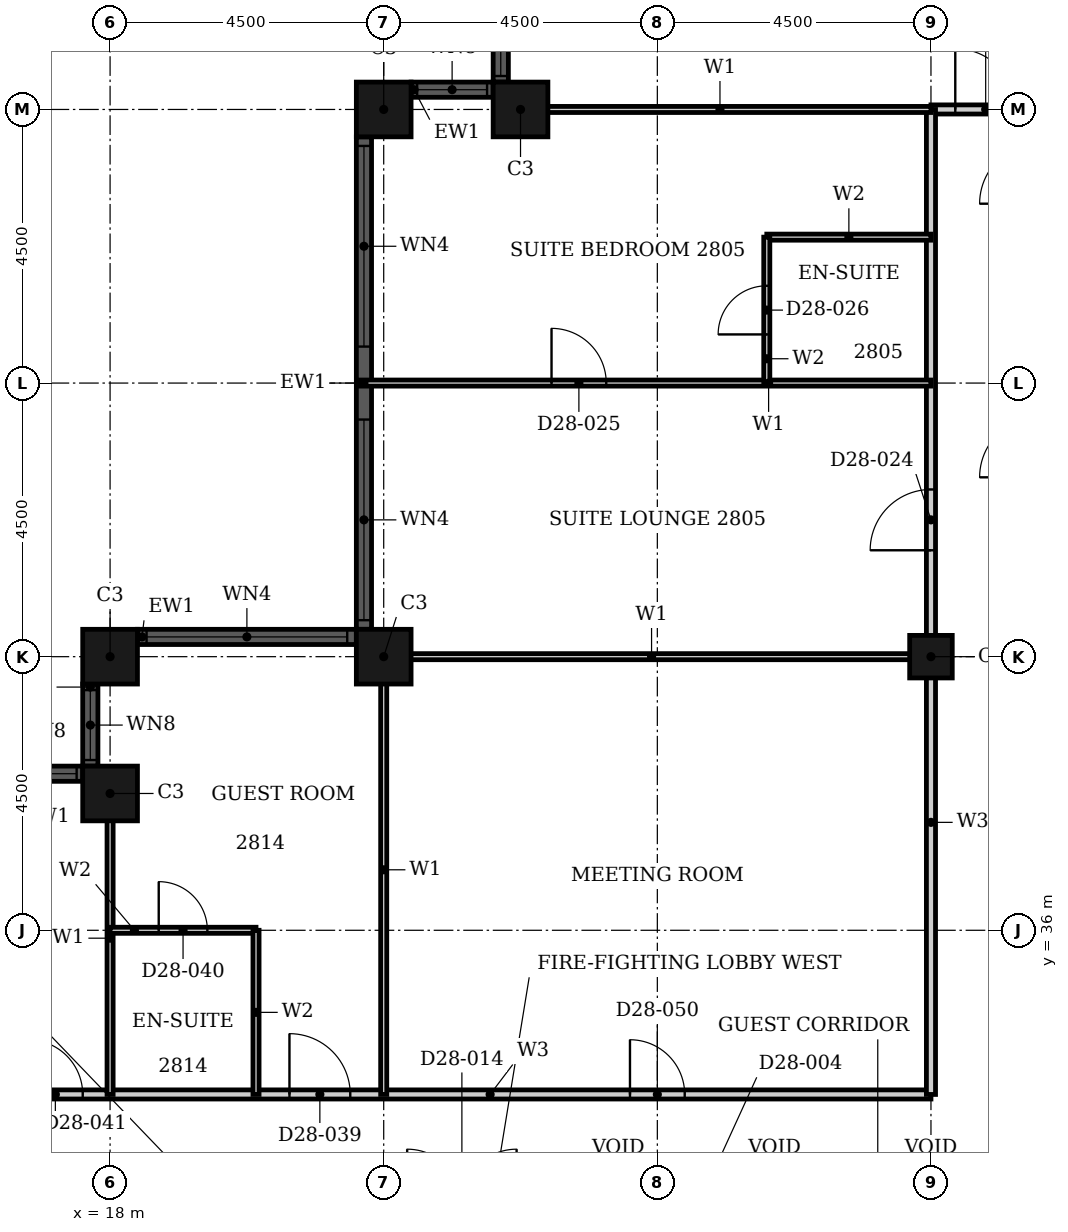
"""IFC4 building model, lengths in metres.
Left out: names, types, materials, properties, quantities, classifications, styles, units other than length and angle.
Written with IfcOpenShell. Run it as: python <this file> out.ifc"""

import sys

from ifc_helpers import new_model, si_unit, direction, frame, frame_2d, origin, origin_2d, place, context, subcontext, project, spatial, rectangle, hollow_rectangle, extrude, element, fill, save


model = new_model("IFC4")
c1 = context("Model", 3, precision=1e-05, world=origin(), true_north=direction((0.0, 1.0)))
c2 = subcontext(c1, "Body", "Model", "MODEL_VIEW")
j1 = project(units=[si_unit("LENGTHUNIT", "METRE"), si_unit("PLANEANGLEUNIT", "RADIAN")], contexts=[c1])
p1 = place(None, origin())
s1 = spatial("IfcSite", under=j1, at=p1, CompositionType="ELEMENT")
p2 = place(p1, origin())
s2 = spatial("IfcBuilding", under=s1, at=p2, CompositionType="ELEMENT")
p3 = place(p2, frame((0.0, 0.0, 115.2)))
s3 = spatial("IfcBuildingStorey", under=s2, at=p3, CompositionType="ELEMENT", Elevation=115.2)
for number, where, z_axis, x_axis in (
    (1, (24.75, 49.5, 0.0), (0.0, 0.0, 1.0), (1.0, 0.0, 0.0)),
    (2, (22.5, 49.5, 0.0), (0.0, 0.0, 1.0), (1.0, 0.0, 0.0)),
    (3, (22.5, 40.5, 0.0), (0.0, 0.0, 1.0), (1.0, 0.0, 0.0)),
    (4, (18.0, 40.5, 0.0), (0.0, 0.0, 1.0), (1.0, 0.0, 0.0)),
    (5, (18.0, 38.25, 0.0), (0.0, 0.0, 1.0), (1.0, 0.0, 0.0)),
):
    element("IfcColumn", number, at=place(p3, frame(where, z_axis=z_axis, x_axis=x_axis)), inside=s3, PredefinedType="COLUMN", context=c2, shape_type="SweptSolid", body=[
        extrude(hollow_rectangle(XDim=0.9, YDim=0.9, WallThickness=0.028, at=origin_2d()), origin(), (0.0, 0.0, 1.0), 3.6),
    ])
p4 = place(p3, frame((31.5, 40.5, 0.0), z_axis=(0.0, 0.0, 1.0), x_axis=(1.0, 0.0, 0.0)))
e6 = element("IfcColumn", 6, at=p4, inside=s3, PredefinedType="COLUMN", context=c2, shape_type="SweptSolid", body=[
    extrude(hollow_rectangle(XDim=0.7, YDim=0.7, WallThickness=0.022, at=origin_2d()), origin(), (0.0, 0.0, 1.0), 3.6),
])
p5 = place(p3, frame((24.425, 51.3, 0.0), z_axis=(0.0, 0.0, 1.0), x_axis=(0.0, -1.0, 0.0)))
e7 = element("IfcWall", 7, at=p5, inside=s3, PredefinedType="SOLIDWALL", context=c2, shape_type="SweptSolid", body=[
    extrude(rectangle(XDim=1.35, YDim=0.25, at=frame_2d((0.675, 0.0))), origin(), (0.0, 0.0, 1.0), 3.6),
])
p6 = place(p5, frame((0.1, 0.0, 0.9)))
e8 = element("IfcOpeningElement", 8, at=p6, cuts=e7, PredefinedType="OPENING", context=c2, shape_type="SweptSolid", body=[
    extrude(rectangle(XDim=1.15, YDim=2.08, at=frame_2d((0.575, 1.04))), frame((0.0, 0.135, 0.0), z_axis=(0.0, -1.0, 0.0), x_axis=(1.0, 0.0, 0.0)), (0.0, 0.0, 1.0), 0.27),
])
p7 = place(p3, frame((24.3, 49.825, 0.0), z_axis=(0.0, 0.0, 1.0), x_axis=(-1.0, 0.0, 0.0)))
e9 = element("IfcWall", 9, at=p7, inside=s3, PredefinedType="SOLIDWALL", context=c2, shape_type="SweptSolid", body=[
    extrude(rectangle(XDim=1.35, YDim=0.25, at=frame_2d((0.675, 0.0))), origin(), (0.0, 0.0, 1.0), 3.6),
])
p8 = place(p7, frame((0.1, 0.0, 0.9)))
e10 = element("IfcOpeningElement", 10, at=p8, cuts=e9, PredefinedType="OPENING", context=c2, shape_type="SweptSolid", body=[
    extrude(rectangle(XDim=1.15, YDim=2.08, at=frame_2d((0.575, 1.04))), frame((0.0, 0.135, 0.0), z_axis=(0.0, -1.0, 0.0), x_axis=(1.0, 0.0, 0.0)), (0.0, 0.0, 1.0), 0.27),
])
p9 = place(p3, frame((22.175, 49.05, 0.0), z_axis=(0.0, 0.0, 1.0), x_axis=(0.0, -1.0, 0.0)))
e11 = element("IfcWall", 11, at=p9, inside=s3, PredefinedType="SOLIDWALL", context=c2, shape_type="SweptSolid", body=[
    extrude(rectangle(XDim=8.1, YDim=0.25, at=frame_2d((4.05, 0.0))), origin(), (0.0, 0.0, 1.0), 3.6),
])
p10 = place(p9, frame((0.15, 0.0, 0.9)))
e12 = element("IfcOpeningElement", 12, at=p10, cuts=e11, PredefinedType="OPENING", context=c2, shape_type="SweptSolid", body=[
    extrude(rectangle(XDim=3.3, YDim=2.08, at=frame_2d((1.65, 1.04))), frame((0.0, 0.135, 0.0), z_axis=(0.0, -1.0, 0.0), x_axis=(1.0, 0.0, 0.0)), (0.0, 0.0, 1.0), 0.27),
])
p11 = place(p9, frame((4.65, 0.0, 0.9)))
e13 = element("IfcOpeningElement", 13, at=p11, cuts=e11, PredefinedType="OPENING", context=c2, shape_type="SweptSolid", body=[
    extrude(rectangle(XDim=3.3, YDim=2.08, at=frame_2d((1.65, 1.04))), frame((0.0, 0.135, 0.0), z_axis=(0.0, -1.0, 0.0), x_axis=(1.0, 0.0, 0.0)), (0.0, 0.0, 1.0), 0.27),
])
p12 = place(p3, frame((22.05, 40.825, 0.0), z_axis=(0.0, 0.0, 1.0), x_axis=(-1.0, 0.0, 0.0)))
e14 = element("IfcWall", 14, at=p12, inside=s3, PredefinedType="SOLIDWALL", context=c2, shape_type="SweptSolid", body=[
    extrude(rectangle(XDim=3.6, YDim=0.25, at=frame_2d((1.8, 0.0))), origin(), (0.0, 0.0, 1.0), 3.6),
])
p13 = place(p12, frame((0.15, 0.0, 0.9)))
e15 = element("IfcOpeningElement", 15, at=p13, cuts=e14, PredefinedType="OPENING", context=c2, shape_type="SweptSolid", body=[
    extrude(rectangle(XDim=3.3, YDim=2.08, at=frame_2d((1.65, 1.04))), frame((0.0, 0.135, 0.0), z_axis=(0.0, -1.0, 0.0), x_axis=(1.0, 0.0, 0.0)), (0.0, 0.0, 1.0), 0.27),
])
p14 = place(p3, frame((17.675, 40.05, 0.0), z_axis=(0.0, 0.0, 1.0), x_axis=(0.0, -1.0, 0.0)))
e16 = element("IfcWall", 16, at=p14, inside=s3, PredefinedType="SOLIDWALL", context=c2, shape_type="SweptSolid", body=[
    extrude(rectangle(XDim=1.35, YDim=0.25, at=frame_2d((0.675, 0.0))), origin(), (0.0, 0.0, 1.0), 3.6),
])
p15 = place(p14, frame((0.1, 0.0, 0.9)))
e17 = element("IfcOpeningElement", 17, at=p15, cuts=e16, PredefinedType="OPENING", context=c2, shape_type="SweptSolid", body=[
    extrude(rectangle(XDim=1.15, YDim=2.08, at=frame_2d((0.575, 1.04))), frame((0.0, 0.135, 0.0), z_axis=(0.0, -1.0, 0.0), x_axis=(1.0, 0.0, 0.0)), (0.0, 0.0, 1.0), 0.27),
])
p16 = place(p3, frame((17.55, 38.575, 0.0), z_axis=(0.0, 0.0, 1.0), x_axis=(-1.0, 0.0, 0.0)))
e18 = element("IfcWall", 18, at=p16, inside=s3, PredefinedType="SOLIDWALL", context=c2, shape_type="SweptSolid", body=[
    extrude(rectangle(XDim=1.35, YDim=0.25, at=frame_2d((0.675, 0.0))), origin(), (0.0, 0.0, 1.0), 3.6),
])
p17 = place(p16, frame((0.1, 0.0, 0.9)))
e19 = element("IfcOpeningElement", 19, at=p17, cuts=e18, PredefinedType="OPENING", context=c2, shape_type="SweptSolid", body=[
    extrude(rectangle(XDim=1.15, YDim=2.08, at=frame_2d((0.575, 1.04))), frame((0.0, 0.135, 0.0), z_axis=(0.0, -1.0, 0.0), x_axis=(1.0, 0.0, 0.0)), (0.0, 0.0, 1.0), 0.27),
])
p18 = place(p3, frame((16.2, 33.3, 0.0), z_axis=(0.0, 0.0, 1.0), x_axis=(1.0, 0.0, 0.0)))
e20 = element("IfcWall", 20, at=p18, inside=s3, PredefinedType="PARTITIONING", context=c2, shape_type="SweptSolid", body=[
    extrude(rectangle(XDim=15.3, YDim=0.15, at=frame_2d((7.65, 0.0))), origin(), (0.0, 0.0, 1.0), 3.3),
])
p19 = place(p18, frame((4.75, 0.0, 0.0)))
e21 = element("IfcOpeningElement", 21, at=p19, cuts=e20, PredefinedType="OPENING", context=c2, shape_type="SweptSolid", body=[
    extrude(rectangle(XDim=1.0, YDim=2.1, at=frame_2d((0.5, 1.05))), frame((0.0, 0.085, 0.0), z_axis=(0.0, -1.0, 0.0), x_axis=(1.0, 0.0, 0.0)), (0.0, 0.0, 1.0), 0.17),
])
p20 = place(p18, frame((0.45, 0.0, 0.0)))
e22 = element("IfcOpeningElement", 22, at=p20, cuts=e20, PredefinedType="OPENING", context=c2, shape_type="SweptSolid", body=[
    extrude(rectangle(XDim=0.9, YDim=2.1, at=frame_2d((0.45, 1.05))), frame((0.0, 0.085, 0.0), z_axis=(0.0, -1.0, 0.0), x_axis=(1.0, 0.0, 0.0)), (0.0, 0.0, 1.0), 0.17),
])
p21 = place(p18, frame((10.35, 0.0, 0.0)))
e23 = element("IfcOpeningElement", 23, at=p21, cuts=e20, PredefinedType="OPENING", context=c2, shape_type="SweptSolid", body=[
    extrude(rectangle(XDim=0.9, YDim=2.1, at=frame_2d((0.45, 1.05))), frame((0.0, 0.085, 0.0), z_axis=(0.0, -1.0, 0.0), x_axis=(1.0, 0.0, 0.0)), (0.0, 0.0, 1.0), 0.17),
])
p22 = place(p3, frame((31.5, 49.5, 0.0), z_axis=(0.0, 0.0, 1.0), x_axis=(1.0, 0.0, 0.0)))
e24 = element("IfcWall", 24, at=p22, inside=s3, PredefinedType="PARTITIONING", context=c2, shape_type="SweptSolid", body=[
    extrude(rectangle(XDim=1.8, YDim=0.15, at=frame_2d((0.9, 0.0))), origin(), (0.0, 0.0, 1.0), 3.3),
])
p23 = place(p22, frame((0.4, 0.0, 0.0)))
e25 = element("IfcOpeningElement", 25, at=p23, cuts=e24, PredefinedType="OPENING", context=c2, shape_type="SweptSolid", body=[
    extrude(rectangle(XDim=1.0, YDim=2.1, at=frame_2d((0.5, 1.05))), frame((0.0, 0.085, 0.0), z_axis=(0.0, -1.0, 0.0), x_axis=(1.0, 0.0, 0.0)), (0.0, 0.0, 1.0), 0.17),
])
p24 = place(p3, frame((31.5, 33.3, 0.0), z_axis=(0.0, 0.0, 1.0), x_axis=(0.0, 1.0, 0.0)))
e26 = element("IfcWall", 26, at=p24, inside=s3, PredefinedType="PARTITIONING", context=c2, shape_type="SweptSolid", body=[
    extrude(rectangle(XDim=16.2, YDim=0.15, at=frame_2d((8.1, 0.0))), origin(), (0.0, 0.0, 1.0), 2.58),
])
p25 = place(p24, frame((8.95, 0.0, 0.0)))
e27 = element("IfcOpeningElement", 27, at=p25, cuts=e26, PredefinedType="OPENING", context=c2, shape_type="SweptSolid", body=[
    extrude(rectangle(XDim=1.0, YDim=2.1, at=frame_2d((0.5, 1.05))), frame((0.0, 0.085, 0.0), z_axis=(0.0, -1.0, 0.0), x_axis=(1.0, 0.0, 0.0)), (0.0, 0.0, 1.0), 0.17),
])
p26 = place(p3, frame((22.31, 40.5, 0.0), z_axis=(0.0, 0.0, 1.0), x_axis=(1.0, 0.0, 0.0)))
e28 = element("IfcWall", 28, at=p26, inside=s3, PredefinedType="PARTITIONING", context=c2, shape_type="SweptSolid", body=[
    extrude(rectangle(XDim=9.19, YDim=0.1, at=frame_2d((4.595, 0.0))), origin(), (0.0, 0.0, 1.0), 2.38),
])
p27 = place(p3, frame((22.11, 45.0, 0.0), z_axis=(0.0, 0.0, 1.0), x_axis=(1.0, 0.0, 0.0)))
e29 = element("IfcWall", 29, at=p27, inside=s3, PredefinedType="PARTITIONING", context=c2, shape_type="SweptSolid", body=[
    extrude(rectangle(XDim=9.39, YDim=0.1, at=frame_2d((4.695, 0.0))), origin(), (0.0, 0.0, 1.0), 3.3),
])
p28 = place(p27, frame((3.15, 0.0, 0.0)))
e30 = element("IfcOpeningElement", 30, at=p28, cuts=e29, PredefinedType="OPENING", context=c2, shape_type="SweptSolid", body=[
    extrude(rectangle(XDim=0.9, YDim=2.1, at=frame_2d((0.45, 1.05))), frame((0.0, 0.06, 0.0), z_axis=(0.0, -1.0, 0.0), x_axis=(1.0, 0.0, 0.0)), (0.0, 0.0, 1.0), 0.12),
])
p29 = place(p3, frame((24.56, 49.5, 0.0), z_axis=(0.0, 0.0, 1.0), x_axis=(1.0, 0.0, 0.0)))
e31 = element("IfcWall", 31, at=p29, inside=s3, PredefinedType="PARTITIONING", context=c2, shape_type="SweptSolid", body=[
    extrude(rectangle(XDim=6.94, YDim=0.1, at=frame_2d((3.47, 0.0))), origin(), (0.0, 0.0, 1.0), 3.3),
])
p30 = place(p3, frame((18.0, 33.3, 0.0), z_axis=(0.0, 0.0, 1.0), x_axis=(0.0, 1.0, 0.0)))
e32 = element("IfcWall", 32, at=p30, inside=s3, PredefinedType="PARTITIONING", context=c2, shape_type="SweptSolid", body=[
    extrude(rectangle(XDim=5.14, YDim=0.1, at=frame_2d((2.57, 0.0))), origin(), (0.0, 0.0, 1.0), 3.3),
])
p31 = place(p3, frame((22.5, 33.3, 0.0), z_axis=(0.0, 0.0, 1.0), x_axis=(0.0, 1.0, 0.0)))
e33 = element("IfcWall", 33, at=p31, inside=s3, PredefinedType="PARTITIONING", context=c2, shape_type="SweptSolid", body=[
    extrude(rectangle(XDim=7.39, YDim=0.1, at=frame_2d((3.695, 0.0))), origin(), (0.0, 0.0, 1.0), 3.3),
])
p32 = place(p3, frame((18.0, 36.0, 0.0), z_axis=(0.0, 0.0, 1.0), x_axis=(1.0, 0.0, 0.0)))
e34 = element("IfcWall", 34, at=p32, inside=s3, PredefinedType="PARTITIONING", context=c2, shape_type="SweptSolid", body=[
    extrude(rectangle(XDim=2.4, YDim=0.1, at=frame_2d((1.2, 0.0))), origin(), (0.0, 0.0, 1.0), 3.3),
])
p33 = place(p32, frame((0.8, 0.0, 0.0)))
e35 = element("IfcOpeningElement", 35, at=p33, cuts=e34, PredefinedType="OPENING", context=c2, shape_type="SweptSolid", body=[
    extrude(rectangle(XDim=0.8, YDim=2.1, at=frame_2d((0.4, 1.05))), frame((0.0, 0.06, 0.0), z_axis=(0.0, -1.0, 0.0), x_axis=(1.0, 0.0, 0.0)), (0.0, 0.0, 1.0), 0.12),
])
for number, where, z_axis, x_axis in (
    (36, (28.8, 47.4, 0.0), (0.0, 0.0, 1.0), (1.0, 0.0, 0.0)),
    (37, (20.4, 33.3, 0.0), (0.0, 0.0, 1.0), (0.0, 1.0, 0.0)),
):
    element("IfcWall", number, at=place(p3, frame(where, z_axis=z_axis, x_axis=x_axis)), inside=s3, PredefinedType="PARTITIONING", context=c2, shape_type="SweptSolid", body=[
        extrude(rectangle(XDim=2.7, YDim=0.1, at=frame_2d((1.35, 0.0))), origin(), (0.0, 0.0, 1.0), 3.3),
    ])
p34 = place(p3, frame((28.8, 45.0, 0.0), z_axis=(0.0, 0.0, 1.0), x_axis=(0.0, 1.0, 0.0)))
e38 = element("IfcWall", 38, at=p34, inside=s3, PredefinedType="PARTITIONING", context=c2, shape_type="SweptSolid", body=[
    extrude(rectangle(XDim=2.4, YDim=0.1, at=frame_2d((1.2, 0.0))), origin(), (0.0, 0.0, 1.0), 3.3),
])
p35 = place(p34, frame((0.8, 0.0, 0.0)))
e39 = element("IfcOpeningElement", 39, at=p35, cuts=e38, PredefinedType="OPENING", context=c2, shape_type="SweptSolid", body=[
    extrude(rectangle(XDim=0.8, YDim=2.1, at=frame_2d((0.4, 1.05))), frame((0.0, 0.06, 0.0), z_axis=(0.0, -1.0, 0.0), x_axis=(1.0, 0.0, 0.0)), (0.0, 0.0, 1.0), 0.12),
])
p36 = place(p6, origin())
e40 = element("IfcWindow", 40, at=p36, inside=s3, PartitioningType="SINGLE_PANEL", PredefinedType="WINDOW", context=c2, shape_type="SweptSolid", body=[
    extrude(rectangle(XDim=1.15, YDim=2.08, at=frame_2d((0.575, 1.04))), frame((0.0, 0.03, 0.0), z_axis=(0.0, -1.0, 0.0), x_axis=(1.0, 0.0, 0.0)), (0.0, 0.0, 1.0), 0.06),
])
fill(e8, e40)
p37 = place(p8, origin())
e41 = element("IfcWindow", 41, at=p37, inside=s3, PartitioningType="SINGLE_PANEL", PredefinedType="WINDOW", context=c2, shape_type="SweptSolid", body=[
    extrude(rectangle(XDim=1.15, YDim=2.08, at=frame_2d((0.575, 1.04))), frame((0.0, 0.03, 0.0), z_axis=(0.0, -1.0, 0.0), x_axis=(1.0, 0.0, 0.0)), (0.0, 0.0, 1.0), 0.06),
])
fill(e10, e41)
p38 = place(p10, origin())
e42 = element("IfcWindow", 42, at=p38, inside=s3, PartitioningType="SINGLE_PANEL", PredefinedType="WINDOW", context=c2, shape_type="SweptSolid", body=[
    extrude(rectangle(XDim=3.3, YDim=2.08, at=frame_2d((1.65, 1.04))), frame((0.0, 0.03, 0.0), z_axis=(0.0, -1.0, 0.0), x_axis=(1.0, 0.0, 0.0)), (0.0, 0.0, 1.0), 0.06),
])
fill(e12, e42)
p39 = place(p11, origin())
e43 = element("IfcWindow", 43, at=p39, inside=s3, PartitioningType="SINGLE_PANEL", PredefinedType="WINDOW", context=c2, shape_type="SweptSolid", body=[
    extrude(rectangle(XDim=3.3, YDim=2.08, at=frame_2d((1.65, 1.04))), frame((0.0, 0.03, 0.0), z_axis=(0.0, -1.0, 0.0), x_axis=(1.0, 0.0, 0.0)), (0.0, 0.0, 1.0), 0.06),
])
fill(e13, e43)
p40 = place(p13, origin())
e44 = element("IfcWindow", 44, at=p40, inside=s3, PartitioningType="SINGLE_PANEL", PredefinedType="WINDOW", context=c2, shape_type="SweptSolid", body=[
    extrude(rectangle(XDim=3.3, YDim=2.08, at=frame_2d((1.65, 1.04))), frame((0.0, 0.03, 0.0), z_axis=(0.0, -1.0, 0.0), x_axis=(1.0, 0.0, 0.0)), (0.0, 0.0, 1.0), 0.06),
])
fill(e15, e44)
p41 = place(p15, origin())
e45 = element("IfcWindow", 45, at=p41, inside=s3, PartitioningType="SINGLE_PANEL", PredefinedType="WINDOW", context=c2, shape_type="SweptSolid", body=[
    extrude(rectangle(XDim=1.15, YDim=2.08, at=frame_2d((0.575, 1.04))), frame((0.0, 0.03, 0.0), z_axis=(0.0, -1.0, 0.0), x_axis=(1.0, 0.0, 0.0)), (0.0, 0.0, 1.0), 0.06),
])
fill(e17, e45)
p42 = place(p17, origin())
e46 = element("IfcWindow", 46, at=p42, inside=s3, PartitioningType="SINGLE_PANEL", PredefinedType="WINDOW", context=c2, shape_type="SweptSolid", body=[
    extrude(rectangle(XDim=1.15, YDim=2.08, at=frame_2d((0.575, 1.04))), frame((0.0, 0.03, 0.0), z_axis=(0.0, -1.0, 0.0), x_axis=(1.0, 0.0, 0.0)), (0.0, 0.0, 1.0), 0.06),
])
fill(e19, e46)
p43 = place(p25, origin())
e47 = element("IfcDoor", 47, at=p43, inside=s3, OperationType="SINGLE_SWING_LEFT", PredefinedType="DOOR", context=c2, shape_type="SweptSolid", body=[
    extrude(rectangle(XDim=1.0, YDim=2.1, at=frame_2d((0.5, 1.05))), frame((0.0, 0.025, 0.0), z_axis=(0.0, -1.0, 0.0), x_axis=(1.0, 0.0, 0.0)), (0.0, 0.0, 1.0), 0.05),
])
fill(e27, e47)
p44 = place(p28, origin())
e48 = element("IfcDoor", 48, at=p44, inside=s3, OperationType="SINGLE_SWING_LEFT", PredefinedType="DOOR", context=c2, shape_type="SweptSolid", body=[
    extrude(rectangle(XDim=0.9, YDim=2.1, at=frame_2d((0.45, 1.05))), frame((0.0, 0.025, 0.0), z_axis=(0.0, -1.0, 0.0), x_axis=(1.0, 0.0, 0.0)), (0.0, 0.0, 1.0), 0.05),
])
fill(e30, e48)
p45 = place(p35, origin())
e49 = element("IfcDoor", 49, at=p45, inside=s3, OperationType="SINGLE_SWING_RIGHT", PredefinedType="DOOR", context=c2, shape_type="SweptSolid", body=[
    extrude(rectangle(XDim=0.8, YDim=2.1, at=frame_2d((0.4, 1.05))), frame((0.0, 0.025, 0.0), z_axis=(0.0, -1.0, 0.0), x_axis=(1.0, 0.0, 0.0)), (0.0, 0.0, 1.0), 0.05),
])
fill(e39, e49)
p46 = place(p23, origin())
e50 = element("IfcDoor", 50, at=p46, inside=s3, OperationType="SINGLE_SWING_RIGHT", PredefinedType="DOOR", context=c2, shape_type="SweptSolid", body=[
    extrude(rectangle(XDim=1.0, YDim=2.1, at=frame_2d((0.5, 1.05))), frame((0.0, 0.025, 0.0), z_axis=(0.0, -1.0, 0.0), x_axis=(1.0, 0.0, 0.0)), (0.0, 0.0, 1.0), 0.05),
])
fill(e25, e50)
p47 = place(p19, origin())
e51 = element("IfcDoor", 51, at=p47, inside=s3, OperationType="SINGLE_SWING_RIGHT", PredefinedType="DOOR", context=c2, shape_type="SweptSolid", body=[
    extrude(rectangle(XDim=1.0, YDim=2.1, at=frame_2d((0.5, 1.05))), frame((0.0, 0.025, 0.0), z_axis=(0.0, -1.0, 0.0), x_axis=(1.0, 0.0, 0.0)), (0.0, 0.0, 1.0), 0.05),
])
fill(e21, e51)
p48 = place(p33, origin())
e52 = element("IfcDoor", 52, at=p48, inside=s3, OperationType="SINGLE_SWING_RIGHT", PredefinedType="DOOR", context=c2, shape_type="SweptSolid", body=[
    extrude(rectangle(XDim=0.8, YDim=2.1, at=frame_2d((0.4, 1.05))), frame((0.0, 0.025, 0.0), z_axis=(0.0, -1.0, 0.0), x_axis=(1.0, 0.0, 0.0)), (0.0, 0.0, 1.0), 0.05),
])
fill(e35, e52)
p49 = place(p20, origin())
e53 = element("IfcDoor", 53, at=p49, inside=s3, OperationType="SINGLE_SWING_RIGHT", PredefinedType="DOOR", context=c2, shape_type="SweptSolid", body=[
    extrude(rectangle(XDim=0.9, YDim=2.1, at=frame_2d((0.45, 1.05))), frame((0.0, 0.025, 0.0), z_axis=(0.0, -1.0, 0.0), x_axis=(1.0, 0.0, 0.0)), (0.0, 0.0, 1.0), 0.05),
])
fill(e22, e53)
p50 = place(p21, origin())
e54 = element("IfcDoor", 54, at=p50, inside=s3, OperationType="SINGLE_SWING_RIGHT", PredefinedType="DOOR", context=c2, shape_type="SweptSolid", body=[
    extrude(rectangle(XDim=0.9, YDim=2.1, at=frame_2d((0.45, 1.05))), frame((0.0, 0.025, 0.0), z_axis=(0.0, -1.0, 0.0), x_axis=(1.0, 0.0, 0.0)), (0.0, 0.0, 1.0), 0.05),
])
fill(e23, e54)
save(model, sys.argv[1])
